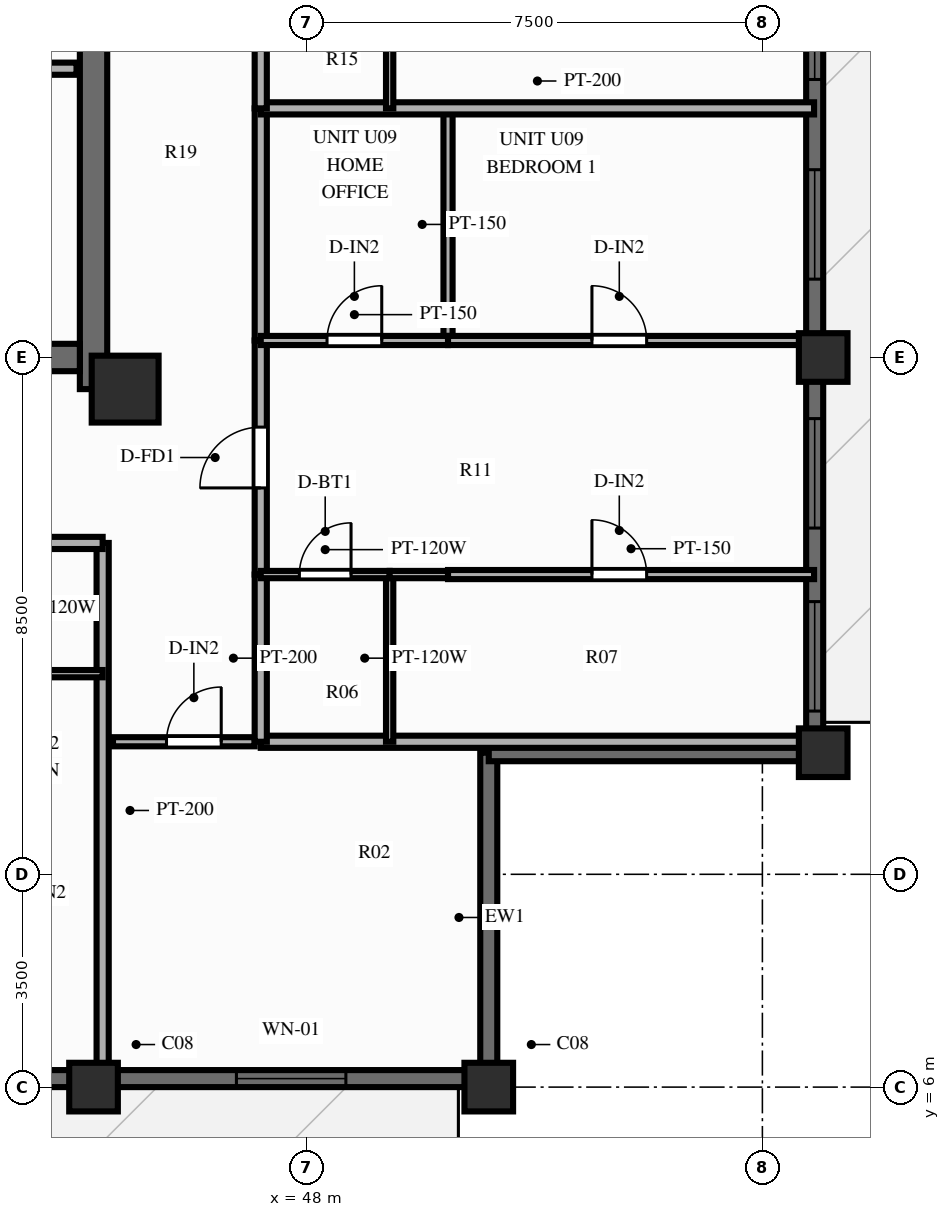
"""IFC4 building model, lengths in metres.
Left out: names, types, materials, properties, quantities, classifications, styles, units other than length and angle.
Written with IfcOpenShell. Run it as: python <this file> out.ifc"""

import sys

from ifc_helpers import new_model, si_unit, direction, frame, frame_2d, origin, origin_2d, place, context, subcontext, project, spatial, rectangle, extrude, source, transform, mapped, element, fill, save


model = new_model("IFC4")
c1 = context("Model", 3, precision=1e-05, world=origin(), true_north=direction((0.0, 1.0)))
c2 = subcontext(c1, "Body", "Model", "MODEL_VIEW")
j1 = project(units=[si_unit("LENGTHUNIT", "METRE"), si_unit("PLANEANGLEUNIT", "RADIAN")], contexts=[c1])
p1 = place(None, origin())
s1 = spatial("IfcSite", under=j1, at=p1, CompositionType="ELEMENT")
p2 = place(p1, origin())
s2 = spatial("IfcBuilding", under=s1, at=p2, CompositionType="ELEMENT")
p3 = place(p2, frame((0.0, 0.0, 202.6)))
s3 = spatial("IfcBuildingStorey", under=s2, at=p3, CompositionType="ELEMENT", Elevation=202.6)
p4 = place(p3, frame((44.5, 17.48, 0.0), z_axis=(0.0, 0.0, 1.0), x_axis=(0.0, 1.0, 0.0)))
e1 = element("IfcWall", 1, at=p4, inside=s3, PredefinedType="SHEAR", context=c2, shape_type="SweptSolid", body=[
    extrude(rectangle(XDim=19.04, YDim=0.45, at=frame_2d((9.52, 0.0))), origin(), (0.0, 0.0, 1.0), 3.9),
])
p5 = place(p4, frame((12.67, 0.0, 0.0), z_axis=(0.0, 0.0, 1.0), x_axis=(-1.0, 0.0, 0.0)))
e2 = element("IfcOpeningElement", 2, at=p5, cuts=e1, PredefinedType="OPENING", context=c2, shape_type="SweptSolid", body=[
    extrude(rectangle(XDim=1.1, YDim=2.15, at=frame_2d((0.55, 1.075))), frame((0.0, 0.237, 0.0), z_axis=(0.0, -1.0, 0.0), x_axis=(1.0, 0.0, 0.0)), (0.0, 0.0, 1.0), 0.474),
])
p6 = place(p3, frame((31.725, 18.0, 0.0), z_axis=(0.0, 0.0, 1.0), x_axis=(1.0, 0.0, 0.0)))
e3 = element("IfcWall", 3, at=p6, inside=s3, PredefinedType="SHEAR", context=c2, shape_type="SweptSolid", body=[
    extrude(rectangle(XDim=12.55, YDim=0.45, at=frame_2d((6.275, 0.0))), origin(), (0.0, 0.0, 1.0), 3.9),
])
m1 = source(origin(), c2, "Body", "SweptSolid", [
    extrude(rectangle(XDim=1.1, YDim=1.1, at=origin_2d()), origin(), (0.0, 0.0, 1.0), 3.9),
])
p7 = place(p3, frame((45.02, 17.48, 0.0), z_axis=(0.0, 0.0, 1.0), x_axis=(1.0, 0.0, 0.0)))
e4 = element("IfcColumn", 4, at=p7, inside=s3, PredefinedType="COLUMN", context=c2, shape_type="MappedRepresentation", body=[
    mapped(m1, transform((0.0, 0.0, 0.0), scale=1.0)),
])
m2 = source(origin(), c2, "Body", "SweptSolid", [
    extrude(rectangle(XDim=0.8, YDim=0.8, at=origin_2d()), origin(), (0.0, 0.0, 1.0), 3.9),
])
for number, where, z_axis, x_axis in (
    (5, (44.5, 6.0, 0.0), (0.0, 0.0, 1.0), (1.0, 0.0, 0.0)),
    (6, (51.0, 6.0, 0.0), (0.0, 0.0, 1.0), (1.0, 0.0, 0.0)),
    (7, (56.5, 11.5, 0.0), (0.0, 0.0, 1.0), (1.0, 0.0, 0.0)),
    (8, (56.5, 18.0, 0.0), (0.0, 0.0, 1.0), (1.0, 0.0, 0.0)),
):
    element("IfcColumn", number, at=place(p3, frame(where, z_axis=z_axis, x_axis=x_axis)), inside=s3, PredefinedType="COLUMN", context=c2, shape_type="MappedRepresentation", body=[
        mapped(m2, transform((0.0, 0.0, 0.0), scale=1.0)),
    ])
p8 = place(p3, frame((25.0, 6.14, 0.0), z_axis=(0.0, 0.0, 1.0), x_axis=(1.0, 0.0, 0.0)))
e9 = element("IfcWall", 9, at=p8, inside=s3, PredefinedType="SOLIDWALL", context=c2, shape_type="SweptSolid", body=[
    extrude(rectangle(XDim=26.0, YDim=0.28, at=frame_2d((13.0, 0.0))), origin(), (0.0, 0.0, 1.0), 2.79),
])
p9 = place(p8, frame((3.8, 0.0, 0.0), z_axis=(0.0, 0.0, 1.0), x_axis=(-1.0, 0.0, 0.0)))
e10 = element("IfcOpeningElement", 10, at=p9, cuts=e9, PredefinedType="OPENING", context=c2, shape_type="SweptSolid", body=[
    extrude(rectangle(XDim=1.1, YDim=2.15, at=frame_2d((0.55, 1.075))), frame((0.0, 0.152, 0.0), z_axis=(0.0, -1.0, 0.0), x_axis=(1.0, 0.0, 0.0)), (0.0, 0.0, 1.0), 0.304),
])
p10 = place(p8, frame((7.22, 0.0, 0.85)))
e11 = element("IfcOpeningElement", 11, at=p10, cuts=e9, PredefinedType="OPENING", context=c2, shape_type="SweptSolid", body=[
    extrude(rectangle(XDim=1.5, YDim=1.65, at=frame_2d((0.75, 0.825))), frame((0.0, 0.152, 0.0), z_axis=(0.0, -1.0, 0.0), x_axis=(1.0, 0.0, 0.0)), (0.0, 0.0, 1.0), 0.304),
])
p11 = place(p8, frame((10.2, 0.0, 0.85)))
e12 = element("IfcOpeningElement", 12, at=p11, cuts=e9, PredefinedType="OPENING", context=c2, shape_type="SweptSolid", body=[
    extrude(rectangle(XDim=1.8, YDim=1.65, at=frame_2d((0.9, 0.825))), frame((0.0, 0.152, 0.0), z_axis=(0.0, -1.0, 0.0), x_axis=(1.0, 0.0, 0.0)), (0.0, 0.0, 1.0), 0.304),
])
p12 = place(p8, frame((14.0, 0.0, 0.85)))
e13 = element("IfcOpeningElement", 13, at=p12, cuts=e9, PredefinedType="OPENING", context=c2, shape_type="SweptSolid", body=[
    extrude(rectangle(XDim=1.8, YDim=1.65, at=frame_2d((0.9, 0.825))), frame((0.0, 0.152, 0.0), z_axis=(0.0, -1.0, 0.0), x_axis=(1.0, 0.0, 0.0)), (0.0, 0.0, 1.0), 0.304),
])
p13 = place(p8, frame((17.28, 0.0, 0.85)))
e14 = element("IfcOpeningElement", 14, at=p13, cuts=e9, PredefinedType="OPENING", context=c2, shape_type="SweptSolid", body=[
    extrude(rectangle(XDim=1.5, YDim=1.65, at=frame_2d((0.75, 0.825))), frame((0.0, 0.152, 0.0), z_axis=(0.0, -1.0, 0.0), x_axis=(1.0, 0.0, 0.0)), (0.0, 0.0, 1.0), 0.304),
])
p14 = place(p8, frame((21.85, 0.0, 0.85)))
e15 = element("IfcOpeningElement", 15, at=p14, cuts=e9, PredefinedType="OPENING", context=c2, shape_type="SweptSolid", body=[
    extrude(rectangle(XDim=1.8, YDim=1.65, at=frame_2d((0.9, 0.825))), frame((0.0, 0.152, 0.0), z_axis=(0.0, -1.0, 0.0), x_axis=(1.0, 0.0, 0.0)), (0.0, 0.0, 1.0), 0.304),
])
p15 = place(p3, frame((56.36, 11.5, 0.0), z_axis=(0.0, 0.0, 1.0), x_axis=(0.0, 1.0, 0.0)))
e16 = element("IfcWall", 16, at=p15, inside=s3, PredefinedType="SOLIDWALL", context=c2, shape_type="SweptSolid", body=[
    extrude(rectangle(XDim=31.0, YDim=0.28, at=frame_2d((15.5, 0.0))), origin(), (0.0, 0.0, 1.0), 2.79),
])
p16 = place(p15, frame((0.685, 0.0, 0.85)))
e17 = element("IfcOpeningElement", 17, at=p16, cuts=e16, PredefinedType="OPENING", context=c2, shape_type="SweptSolid", body=[
    extrude(rectangle(XDim=1.8, YDim=1.65, at=frame_2d((0.9, 0.825))), frame((0.0, 0.152, 0.0), z_axis=(0.0, -1.0, 0.0), x_axis=(1.0, 0.0, 0.0)), (0.0, 0.0, 1.0), 0.304),
])
p17 = place(p15, frame((3.695, 0.0, 0.85)))
e18 = element("IfcOpeningElement", 18, at=p17, cuts=e16, PredefinedType="OPENING", context=c2, shape_type="SweptSolid", body=[
    extrude(rectangle(XDim=1.8, YDim=1.65, at=frame_2d((0.9, 0.825))), frame((0.0, 0.152, 0.0), z_axis=(0.0, -1.0, 0.0), x_axis=(1.0, 0.0, 0.0)), (0.0, 0.0, 1.0), 0.304),
])
p18 = place(p15, frame((7.789, 0.0, 0.85)))
e19 = element("IfcOpeningElement", 19, at=p18, cuts=e16, PredefinedType="OPENING", context=c2, shape_type="SweptSolid", body=[
    extrude(rectangle(XDim=1.8, YDim=1.65, at=frame_2d((0.9, 0.825))), frame((0.0, 0.152, 0.0), z_axis=(0.0, -1.0, 0.0), x_axis=(1.0, 0.0, 0.0)), (0.0, 0.0, 1.0), 0.304),
])
p19 = place(p15, frame((11.073, 0.0, 0.85)))
e20 = element("IfcOpeningElement", 20, at=p19, cuts=e16, PredefinedType="OPENING", context=c2, shape_type="SweptSolid", body=[
    extrude(rectangle(XDim=1.8, YDim=1.65, at=frame_2d((0.9, 0.825))), frame((0.0, 0.152, 0.0), z_axis=(0.0, -1.0, 0.0), x_axis=(1.0, 0.0, 0.0)), (0.0, 0.0, 1.0), 0.304),
])
p20 = place(p15, frame((15.907, 0.0, 0.0), z_axis=(0.0, 0.0, 1.0), x_axis=(-1.0, 0.0, 0.0)))
e21 = element("IfcOpeningElement", 21, at=p20, cuts=e16, PredefinedType="OPENING", context=c2, shape_type="SweptSolid", body=[
    extrude(rectangle(XDim=1.6, YDim=2.15, at=frame_2d((0.8, 1.075))), frame((0.0, 0.152, 0.0), z_axis=(0.0, -1.0, 0.0), x_axis=(1.0, 0.0, 0.0)), (0.0, 0.0, 1.0), 0.304),
])
p21 = place(p15, frame((17.888, 0.0, 0.85)))
e22 = element("IfcOpeningElement", 22, at=p21, cuts=e16, PredefinedType="OPENING", context=c2, shape_type="SweptSolid", body=[
    extrude(rectangle(XDim=1.8, YDim=1.65, at=frame_2d((0.9, 0.825))), frame((0.0, 0.152, 0.0), z_axis=(0.0, -1.0, 0.0), x_axis=(1.0, 0.0, 0.0)), (0.0, 0.0, 1.0), 0.304),
])
p22 = place(p15, frame((21.184, 0.0, 0.85)))
e23 = element("IfcOpeningElement", 23, at=p22, cuts=e16, PredefinedType="OPENING", context=c2, shape_type="SweptSolid", body=[
    extrude(rectangle(XDim=1.8, YDim=1.65, at=frame_2d((0.9, 0.825))), frame((0.0, 0.152, 0.0), z_axis=(0.0, -1.0, 0.0), x_axis=(1.0, 0.0, 0.0)), (0.0, 0.0, 1.0), 0.304),
])
p23 = place(p15, frame((25.259, 0.0, 0.85)))
e24 = element("IfcOpeningElement", 24, at=p23, cuts=e16, PredefinedType="OPENING", context=c2, shape_type="SweptSolid", body=[
    extrude(rectangle(XDim=1.2, YDim=1.5, at=frame_2d((0.6, 0.75))), frame((0.0, 0.152, 0.0), z_axis=(0.0, -1.0, 0.0), x_axis=(1.0, 0.0, 0.0)), (0.0, 0.0, 1.0), 0.304),
])
p24 = place(p15, frame((27.969, 0.0, 0.85)))
e25 = element("IfcOpeningElement", 25, at=p24, cuts=e16, PredefinedType="OPENING", context=c2, shape_type="SweptSolid", body=[
    extrude(rectangle(XDim=1.8, YDim=1.65, at=frame_2d((0.9, 0.825))), frame((0.0, 0.152, 0.0), z_axis=(0.0, -1.0, 0.0), x_axis=(1.0, 0.0, 0.0)), (0.0, 0.0, 1.0), 0.304),
])
for number, where, z_axis, x_axis in (
    (26, (51.0, 6.08, 0.0), (0.0, 0.0, 1.0), (0.0, 1.0, 0.0)),
    (27, (51.0, 11.5, 0.0), (0.0, 0.0, 1.0), (1.0, 0.0, 0.0)),
):
    element("IfcWall", number, at=place(p3, frame(where, z_axis=z_axis, x_axis=x_axis)), inside=s3, PredefinedType="SOLIDWALL", context=c2, shape_type="SweptSolid", body=[
        extrude(rectangle(XDim=5.42, YDim=0.28, at=frame_2d((2.71, 0.0))), origin(), (0.0, 0.0, 1.0), 2.79),
    ])
p25 = place(p3, frame((41.55, 22.75, 0.0), z_axis=(0.0, 0.0, 1.0), x_axis=(1.0, 0.0, 0.0)))
e28 = element("IfcWall", 28, at=p25, inside=s3, PredefinedType="PARTITIONING", context=c2, shape_type="SweptSolid", body=[
    extrude(rectangle(XDim=2.67, YDim=0.2, at=frame_2d((1.335, 0.0))), origin(), (0.0, 0.0, 1.0), 3.6),
])
p26 = place(p3, frame((44.82, 11.68, 0.0), z_axis=(0.0, 0.0, 1.0), x_axis=(1.0, 0.0, 0.0)))
e29 = element("IfcWall", 29, at=p26, inside=s3, PredefinedType="PARTITIONING", context=c2, shape_type="SweptSolid", body=[
    extrude(rectangle(XDim=2.33, YDim=0.15, at=frame_2d((1.165, 0.0))), origin(), (0.0, 0.0, 1.0), 3.6),
])
p27 = place(p26, frame((0.88, 0.0, 0.0)))
e30 = element("IfcOpeningElement", 30, at=p27, cuts=e29, PredefinedType="OPENING", context=c2, shape_type="SweptSolid", body=[
    extrude(rectangle(XDim=0.9, YDim=2.1, at=frame_2d((0.45, 1.05))), frame((0.0, 0.087, 0.0), z_axis=(0.0, -1.0, 0.0), x_axis=(1.0, 0.0, 0.0)), (0.0, 0.0, 1.0), 0.174),
])
p28 = place(p3, frame((44.65, 14.95, 0.0), z_axis=(0.0, 0.0, 1.0), x_axis=(0.0, -1.0, 0.0)))
e31 = element("IfcWall", 31, at=p28, inside=s3, PredefinedType="PARTITIONING", context=c2, shape_type="SweptSolid", body=[
    extrude(rectangle(XDim=8.8, YDim=0.2, at=frame_2d((4.4, 0.0))), origin(), (0.0, 0.0, 1.0), 2.79),
])
p29 = place(p3, frame((41.8, 14.95, 0.0), z_axis=(0.0, 0.0, 1.0), x_axis=(1.0, 0.0, 0.0)))
e32 = element("IfcWall", 32, at=p29, inside=s3, PredefinedType="PARTITIONING", context=c2, shape_type="SweptSolid", body=[
    extrude(rectangle(XDim=2.85, YDim=0.2, at=frame_2d((1.425, 0.0))), origin(), (0.0, 0.0, 1.0), 3.6),
])
p30 = place(p3, frame((41.8, 12.8, 0.0), z_axis=(0.0, 0.0, 1.0), x_axis=(1.0, 0.0, 0.0)))
e33 = element("IfcWall", 33, at=p30, inside=s3, PredefinedType="PARTITIONING", context=c2, shape_type="SweptSolid", body=[
    extrude(rectangle(XDim=2.85, YDim=0.12, at=frame_2d((1.425, 0.0))), origin(), (0.0, 0.0, 1.0), 3.6),
])
p31 = place(p3, frame((47.25, 11.68, 0.0), z_axis=(0.0, 0.0, 1.0), x_axis=(1.0, 0.0, 0.0)))
e34 = element("IfcWall", 34, at=p31, inside=s3, PredefinedType="PARTITIONING", context=c2, shape_type="SweptSolid", body=[
    extrude(rectangle(XDim=9.1, YDim=0.2, at=frame_2d((4.55, 0.0))), origin(), (0.0, 0.0, 1.0), 3.6),
])
p32 = place(p3, frame((47.25, 11.68, 0.0), z_axis=(0.0, 0.0, 1.0), x_axis=(0.0, 1.0, 0.0)))
e35 = element("IfcWall", 35, at=p32, inside=s3, PredefinedType="PARTITIONING", context=c2, shape_type="SweptSolid", body=[
    extrude(rectangle(XDim=2.75, YDim=0.2, at=frame_2d((1.375, 0.0))), origin(), (0.0, 0.0, 1.0), 3.6),
])
p33 = place(p3, frame((47.25, 14.43, 0.0), z_axis=(0.0, 0.0, 1.0), x_axis=(0.0, 1.0, 0.0)))
e36 = element("IfcWall", 36, at=p33, inside=s3, PredefinedType="PARTITIONING", context=c2, shape_type="SweptSolid", body=[
    extrude(rectangle(XDim=3.85, YDim=0.2, at=frame_2d((1.925, 0.0))), origin(), (0.0, 0.0, 1.0), 3.6),
])
p34 = place(p33, frame((1.425, 0.0, 0.0)))
e37 = element("IfcOpeningElement", 37, at=p34, cuts=e36, PredefinedType="OPENING", context=c2, shape_type="SweptSolid", body=[
    extrude(rectangle(XDim=1.0, YDim=2.15, at=frame_2d((0.5, 1.075))), frame((0.0, 0.112, 0.0), z_axis=(0.0, -1.0, 0.0), x_axis=(1.0, 0.0, 0.0)), (0.0, 0.0, 1.0), 0.224),
])
p35 = place(p3, frame((47.25, 18.28, 0.0), z_axis=(0.0, 0.0, 1.0), x_axis=(0.0, 1.0, 0.0)))
e38 = element("IfcWall", 38, at=p35, inside=s3, PredefinedType="PARTITIONING", context=c2, shape_type="SweptSolid", body=[
    extrude(rectangle(XDim=3.818, YDim=0.2, at=frame_2d((1.909, 0.0))), origin(), (0.0, 0.0, 1.0), 3.6),
])
p36 = place(p3, frame((49.37, 11.68, 0.0), z_axis=(0.0, 0.0, 1.0), x_axis=(0.0, 1.0, 0.0)))
e39 = element("IfcWall", 39, at=p36, inside=s3, PredefinedType="PARTITIONING", context=c2, shape_type="SweptSolid", body=[
    extrude(rectangle(XDim=2.75, YDim=0.12, at=frame_2d((1.375, 0.0))), origin(), (0.0, 0.0, 1.0), 3.6),
])
p37 = place(p3, frame((50.33, 18.28, 0.0), z_axis=(0.0, 0.0, 1.0), x_axis=(0.0, 1.0, 0.0)))
e40 = element("IfcWall", 40, at=p37, inside=s3, PredefinedType="PARTITIONING", context=c2, shape_type="SweptSolid", body=[
    extrude(rectangle(XDim=3.818, YDim=0.15, at=frame_2d((1.909, 0.0))), origin(), (0.0, 0.0, 1.0), 3.39),
])
p38 = place(p3, frame((47.25, 14.43, 0.0), z_axis=(0.0, 0.0, 1.0), x_axis=(1.0, 0.0, 0.0)))
e41 = element("IfcWall", 41, at=p38, inside=s3, PredefinedType="PARTITIONING", context=c2, shape_type="SweptSolid", body=[
    extrude(rectangle(XDim=2.12, YDim=0.12, at=frame_2d((1.06, 0.0))), origin(), (0.0, 0.0, 1.0), 3.6),
])
p39 = place(p38, frame((0.635, 0.0, 0.0)))
e42 = element("IfcOpeningElement", 42, at=p39, cuts=e41, PredefinedType="OPENING", context=c2, shape_type="SweptSolid", body=[
    extrude(rectangle(XDim=0.85, YDim=2.05, at=frame_2d((0.425, 1.025))), frame((0.0, 0.072, 0.0), z_axis=(0.0, -1.0, 0.0), x_axis=(1.0, 0.0, 0.0)), (0.0, 0.0, 1.0), 0.144),
])
p40 = place(p3, frame((49.37, 14.43, 0.0), z_axis=(0.0, 0.0, 1.0), x_axis=(1.0, 0.0, 0.0)))
e43 = element("IfcWall", 43, at=p40, inside=s3, PredefinedType="PARTITIONING", context=c2, shape_type="SweptSolid", body=[
    extrude(rectangle(XDim=0.96, YDim=0.12, at=frame_2d((0.48, 0.0))), origin(), (0.0, 0.0, 1.0), 3.6),
])
p41 = place(p3, frame((50.33, 14.43, 0.0), z_axis=(0.0, 0.0, 1.0), x_axis=(1.0, 0.0, 0.0)))
e44 = element("IfcWall", 44, at=p41, inside=s3, PredefinedType="PARTITIONING", context=c2, shape_type="SweptSolid", body=[
    extrude(rectangle(XDim=6.02, YDim=0.15, at=frame_2d((3.01, 0.0))), origin(), (0.0, 0.0, 1.0), 3.6),
])
p42 = place(p41, frame((2.367, 0.0, 0.0)))
e45 = element("IfcOpeningElement", 45, at=p42, cuts=e44, PredefinedType="OPENING", context=c2, shape_type="SweptSolid", body=[
    extrude(rectangle(XDim=0.9, YDim=2.1, at=frame_2d((0.45, 1.05))), frame((0.0, 0.087, 0.0), z_axis=(0.0, -1.0, 0.0), x_axis=(1.0, 0.0, 0.0)), (0.0, 0.0, 1.0), 0.174),
])
p43 = place(p3, frame((47.25, 18.28, 0.0), z_axis=(0.0, 0.0, 1.0), x_axis=(1.0, 0.0, 0.0)))
e46 = element("IfcWall", 46, at=p43, inside=s3, PredefinedType="PARTITIONING", context=c2, shape_type="SweptSolid", body=[
    extrude(rectangle(XDim=3.08, YDim=0.15, at=frame_2d((1.54, 0.0))), origin(), (0.0, 0.0, 1.0), 3.6),
])
p44 = place(p43, frame((1.09, 0.0, 0.0)))
e47 = element("IfcOpeningElement", 47, at=p44, cuts=e46, PredefinedType="OPENING", context=c2, shape_type="SweptSolid", body=[
    extrude(rectangle(XDim=0.9, YDim=2.1, at=frame_2d((0.45, 1.05))), frame((0.0, 0.087, 0.0), z_axis=(0.0, -1.0, 0.0), x_axis=(1.0, 0.0, 0.0)), (0.0, 0.0, 1.0), 0.174),
])
p45 = place(p3, frame((50.33, 18.28, 0.0), z_axis=(0.0, 0.0, 1.0), x_axis=(1.0, 0.0, 0.0)))
e48 = element("IfcWall", 48, at=p45, inside=s3, PredefinedType="PARTITIONING", context=c2, shape_type="SweptSolid", body=[
    extrude(rectangle(XDim=6.02, YDim=0.15, at=frame_2d((3.01, 0.0))), origin(), (0.0, 0.0, 1.0), 3.6),
])
p46 = place(p45, frame((2.367, 0.0, 0.0)))
e49 = element("IfcOpeningElement", 49, at=p46, cuts=e48, PredefinedType="OPENING", context=c2, shape_type="SweptSolid", body=[
    extrude(rectangle(XDim=0.9, YDim=2.1, at=frame_2d((0.45, 1.05))), frame((0.0, 0.087, 0.0), z_axis=(0.0, -1.0, 0.0), x_axis=(1.0, 0.0, 0.0)), (0.0, 0.0, 1.0), 0.174),
])
p47 = place(p3, frame((47.25, 22.098, 0.0), z_axis=(0.0, 0.0, 1.0), x_axis=(1.0, 0.0, 0.0)))
e50 = element("IfcWall", 50, at=p47, inside=s3, PredefinedType="PARTITIONING", context=c2, shape_type="SweptSolid", body=[
    extrude(rectangle(XDim=9.1, YDim=0.2, at=frame_2d((4.55, 0.0))), origin(), (0.0, 0.0, 1.0), 3.29),
])
p48 = place(p3, frame((47.25, 22.098, 0.0), z_axis=(0.0, 0.0, 1.0), x_axis=(0.0, 1.0, 0.0)))
e51 = element("IfcWall", 51, at=p48, inside=s3, PredefinedType="PARTITIONING", context=c2, shape_type="SweptSolid", body=[
    extrude(rectangle(XDim=2.75, YDim=0.2, at=frame_2d((1.375, 0.0))), origin(), (0.0, 0.0, 1.0), 3.6),
])
p49 = place(p3, frame((49.37, 22.098, 0.0), z_axis=(0.0, 0.0, 1.0), x_axis=(0.0, 1.0, 0.0)))
e52 = element("IfcWall", 52, at=p49, inside=s3, PredefinedType="PARTITIONING", context=c2, shape_type="SweptSolid", body=[
    extrude(rectangle(XDim=2.75, YDim=0.12, at=frame_2d((1.375, 0.0))), origin(), (0.0, 0.0, 1.0), 3.6),
])
m3 = source(origin(), c2, "Body", "SweptSolid", [
    extrude(rectangle(XDim=1.8, YDim=1.65, at=frame_2d((0.9, 0.825))), frame((0.0, 0.03, 0.0), z_axis=(0.0, -1.0, 0.0), x_axis=(1.0, 0.0, 0.0)), (0.0, 0.0, 1.0), 0.06),
])
p50 = place(p14, origin())
e53 = element("IfcWindow", 53, at=p50, inside=s3, PartitioningType="SINGLE_PANEL", PredefinedType="WINDOW", context=c2, shape_type="MappedRepresentation", body=[
    mapped(m3, transform((0.0, 0.0, 0.0), scale=1.0)),
])
fill(e15, e53)
p51 = place(p16, origin())
e54 = element("IfcWindow", 54, at=p51, inside=s3, PartitioningType="SINGLE_PANEL", PredefinedType="WINDOW", context=c2, shape_type="MappedRepresentation", body=[
    mapped(m3, transform((0.0, 0.0, 0.0), scale=1.0)),
])
fill(e17, e54)
p52 = place(p17, origin())
e55 = element("IfcWindow", 55, at=p52, inside=s3, PartitioningType="SINGLE_PANEL", PredefinedType="WINDOW", context=c2, shape_type="MappedRepresentation", body=[
    mapped(m3, transform((0.0, 0.0, 0.0), scale=1.0)),
])
fill(e18, e55)
p53 = place(p18, origin())
e56 = element("IfcWindow", 56, at=p53, inside=s3, PartitioningType="SINGLE_PANEL", PredefinedType="WINDOW", context=c2, shape_type="MappedRepresentation", body=[
    mapped(m3, transform((0.0, 0.0, 0.0), scale=1.0)),
])
fill(e19, e56)
p54 = place(p19, origin())
e57 = element("IfcWindow", 57, at=p54, inside=s3, PartitioningType="SINGLE_PANEL", PredefinedType="WINDOW", context=c2, shape_type="MappedRepresentation", body=[
    mapped(m3, transform((0.0, 0.0, 0.0), scale=1.0)),
])
fill(e20, e57)
m4 = source(origin(), c2, "Body", "SweptSolid", [
    extrude(rectangle(XDim=0.9, YDim=2.1, at=frame_2d((0.45, 1.05))), frame((0.0, 0.025, 0.0), z_axis=(0.0, -1.0, 0.0), x_axis=(1.0, 0.0, 0.0)), (0.0, 0.0, 1.0), 0.05),
])
p55 = place(p27, origin())
e58 = element("IfcDoor", 58, at=p55, inside=s3, OperationType="SINGLE_SWING_RIGHT", PredefinedType="DOOR", context=c2, shape_type="MappedRepresentation", body=[
    mapped(m4, transform((0.0, 0.0, 0.0), scale=1.0)),
])
fill(e30, e58)
m5 = source(origin(), c2, "Body", "SweptSolid", [
    extrude(rectangle(XDim=1.0, YDim=2.15, at=frame_2d((0.5, 1.075))), frame((0.0, 0.025, 0.0), z_axis=(0.0, -1.0, 0.0), x_axis=(1.0, 0.0, 0.0)), (0.0, 0.0, 1.0), 0.05),
])
p56 = place(p34, origin())
e59 = element("IfcDoor", 59, at=p56, inside=s3, OperationType="SINGLE_SWING_LEFT", PredefinedType="DOOR", context=c2, shape_type="MappedRepresentation", body=[
    mapped(m5, transform((0.0, 0.0, 0.0), scale=1.0)),
])
fill(e37, e59)
m6 = source(origin(), c2, "Body", "SweptSolid", [
    extrude(rectangle(XDim=0.85, YDim=2.05, at=frame_2d((0.425, 1.025))), frame((0.0, 0.025, 0.0), z_axis=(0.0, -1.0, 0.0), x_axis=(1.0, 0.0, 0.0)), (0.0, 0.0, 1.0), 0.05),
])
p57 = place(p39, origin())
e60 = element("IfcDoor", 60, at=p57, inside=s3, OperationType="SINGLE_SWING_RIGHT", PredefinedType="DOOR", context=c2, shape_type="MappedRepresentation", body=[
    mapped(m6, transform((0.0, 0.0, 0.0), scale=1.0)),
])
fill(e42, e60)
p58 = place(p42, origin())
e61 = element("IfcDoor", 61, at=p58, inside=s3, OperationType="SINGLE_SWING_LEFT", PredefinedType="DOOR", context=c2, shape_type="MappedRepresentation", body=[
    mapped(m4, transform((0.0, 0.0, 0.0), scale=1.0)),
])
fill(e45, e61)
p59 = place(p44, origin())
e62 = element("IfcDoor", 62, at=p59, inside=s3, OperationType="SINGLE_SWING_RIGHT", PredefinedType="DOOR", context=c2, shape_type="MappedRepresentation", body=[
    mapped(m4, transform((0.0, 0.0, 0.0), scale=1.0)),
])
fill(e47, e62)
p60 = place(p46, origin())
e63 = element("IfcDoor", 63, at=p60, inside=s3, OperationType="SINGLE_SWING_LEFT", PredefinedType="DOOR", context=c2, shape_type="MappedRepresentation", body=[
    mapped(m4, transform((0.0, 0.0, 0.0), scale=1.0)),
])
fill(e49, e63)
save(model, sys.argv[1])
